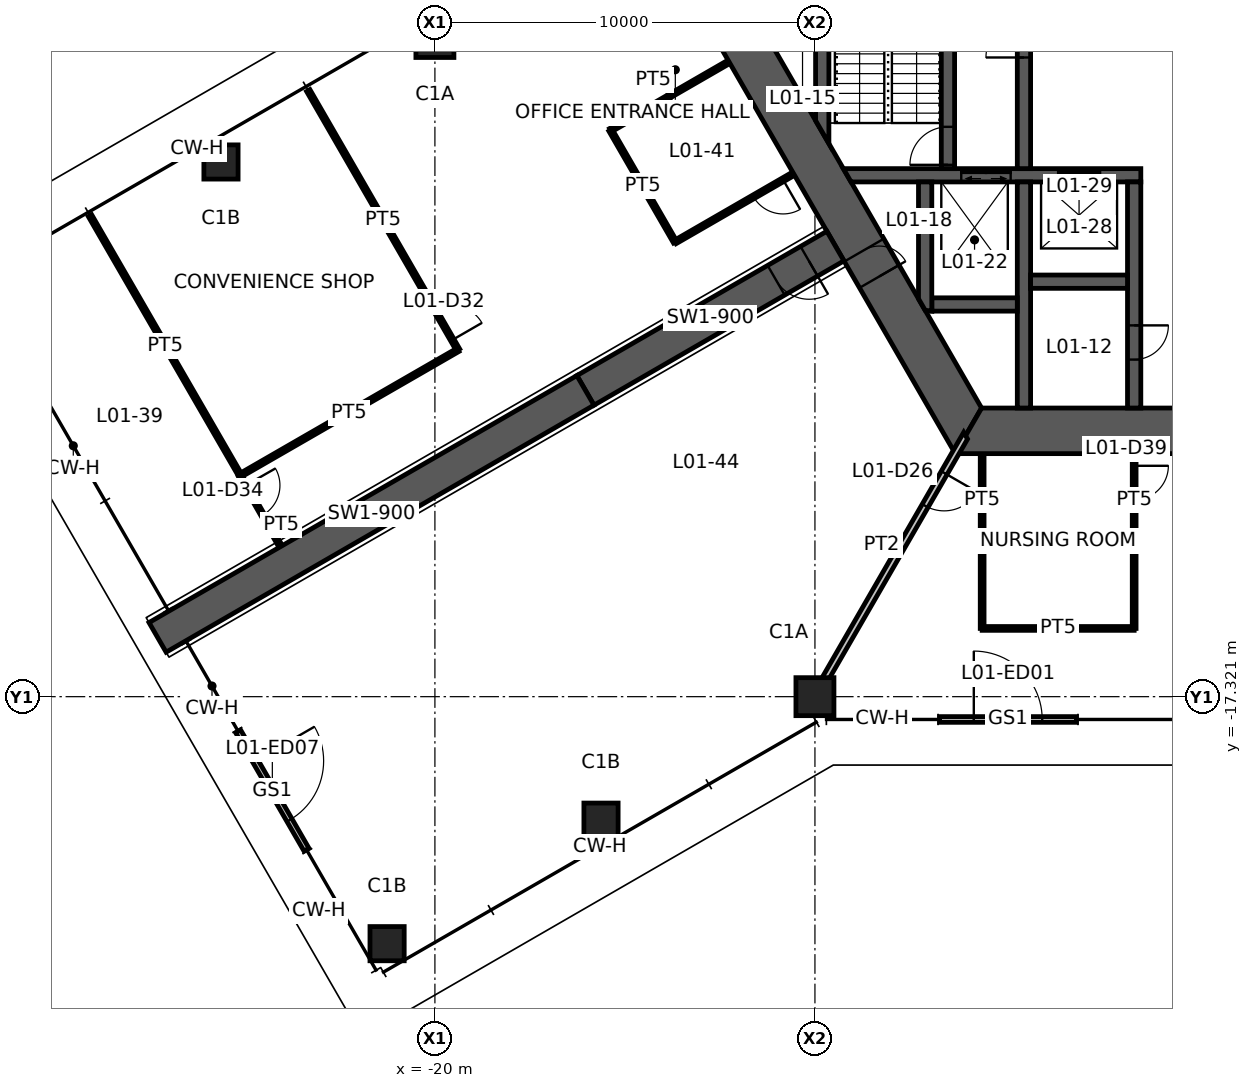
"""IFC4 building model, lengths in metres.
Left out: names, types, materials, properties, quantities, classifications, styles, units other than length and angle.
Written with IfcOpenShell. Run it as: python <this file> out.ifc"""

import sys

from ifc_helpers import new_model, si_unit, direction, frame, frame_2d, origin, origin_2d, place, context, subcontext, project, spatial, polyline, rectangle, hollow_rectangle, outline, extrude, element, fill, save


model = new_model("IFC4")
c1 = context("Model", 3, precision=1e-05, world=origin(), true_north=direction((0.0, 1.0)))
c2 = subcontext(c1, "Body", "Model", "MODEL_VIEW")
j1 = project(units=[si_unit("LENGTHUNIT", "METRE"), si_unit("PLANEANGLEUNIT", "RADIAN")], contexts=[c1])
p1 = place(None, origin())
s1 = spatial("IfcSite", under=j1, at=p1, CompositionType="ELEMENT")
p2 = place(p1, origin())
s2 = spatial("IfcBuilding", under=s1, at=p2, CompositionType="ELEMENT")
p3 = place(p2, origin())
s3 = spatial("IfcBuildingStorey", under=s2, at=p3, CompositionType="ELEMENT", Elevation=0.0)
for number, where, z_axis, x_axis in (
    (1, (-20.0, 0.0, 0.0), (0.0, 0.0, 1.0), (1.0, 0.0, 0.0)),
    (2, (-10.0, -17.321, 0.0), (0.0, 0.0, 1.0), (1.0, 0.0, 0.0)),
):
    element("IfcColumn", number, at=place(p3, frame(where, z_axis=z_axis, x_axis=x_axis)), inside=s3, PredefinedType="COLUMN", context=c2, shape_type="SweptSolid", body=[
        extrude(hollow_rectangle(XDim=1.0, YDim=1.0, WallThickness=0.06, at=origin_2d()), origin(), (0.0, 0.0, 1.0), 5.5),
    ])
for number, where, z_axis, x_axis in (
    (3, (-25.629, -3.25, 0.0), (0.0, 0.0, 1.0), (1.0, 0.0, 0.0)),
    (4, (-15.629, -20.571, 0.0), (0.0, 0.0, 1.0), (1.0, 0.0, 0.0)),
    (5, (-21.258, -23.821, 0.0), (0.0, 0.0, 1.0), (1.0, 0.0, 0.0)),
):
    element("IfcColumn", number, at=place(p3, frame(where, z_axis=z_axis, x_axis=x_axis)), inside=s3, PredefinedType="COLUMN", context=c2, shape_type="SweptSolid", body=[
        extrude(hollow_rectangle(XDim=0.9, YDim=0.9, WallThickness=0.05, at=origin_2d()), origin(), (0.0, 0.0, 1.0), 5.5),
    ])
p4 = place(p3, frame((-11.922, 0.0, 0.0), z_axis=(0.0, 0.0, 1.0), x_axis=(0.500004296715, -0.866022923061, 0.0)))
e6 = element("IfcWall", 6, at=p4, inside=s3, PredefinedType="SHEAR", context=c2, shape_type="SweptSolid", body=[
    extrude(outline(polyline([(-0.346, -0.6), (6.431, -0.6), (7.231, -0.6), (12.269, -0.6), (11.576, 0.6), (7.231, 0.6), (6.431, 0.6), (0.346, 0.6), (-0.346, -0.6)])), origin(), (0.0, 0.0, 1.0), 5.5),
])
p5 = place(p4, frame((6.431, 0.0, 0.0)))
e7 = element("IfcOpeningElement", 7, at=p5, cuts=e6, PredefinedType="OPENING", context=c2, shape_type="SweptSolid", body=[
    extrude(rectangle(XDim=0.8, YDim=2.1, at=frame_2d((0.4, 1.05))), frame((0.0, 0.61, 0.0), z_axis=(0.0, -1.0, 0.0), x_axis=(1.0, 0.0, 0.0)), (0.0, 0.0, 1.0), 1.22),
])
p6 = place(p3, frame((-5.961, -10.325, 0.0), z_axis=(0.0, 0.0, 1.0), x_axis=(1.0, 0.0, 0.0)))
e8 = element("IfcWall", 8, at=p6, inside=s3, PredefinedType="SHEAR", context=c2, shape_type="SweptSolid", body=[
    extrude(outline(polyline([(-0.346, -0.6), (5.461, -0.6), (6.461, -0.6), (12.269, -0.6), (11.576, 0.6), (6.461, 0.6), (5.461, 0.6), (0.346, 0.6), (-0.346, -0.6)])), origin(), (0.0, 0.0, 1.0), 5.5),
])
p7 = place(p6, frame((5.461, 0.0, 0.0)))
e9 = element("IfcOpeningElement", 9, at=p7, cuts=e8, PredefinedType="OPENING", context=c2, shape_type="SweptSolid", body=[
    extrude(rectangle(XDim=1.0, YDim=2.1, at=frame_2d((0.5, 1.05))), frame((0.0, 0.61, 0.0), z_axis=(0.0, -1.0, 0.0), x_axis=(1.0, 0.0, 0.0)), (0.0, 0.0, 1.0), 1.22),
])
p8 = place(p3, frame((-9.461, -5.462, 0.0), z_axis=(0.0, 0.0, 1.0), x_axis=(-0.866019116917, -0.500010889016, 0.0)))
e10 = element("IfcWall", 10, at=p8, inside=s3, PredefinedType="SHEAR", context=c2, shape_type="SweptSolid", body=[
    extrude(rectangle(XDim=7.595, YDim=0.9, at=frame_2d((3.798, 0.0))), origin(), (0.0, 0.0, 1.0), 5.5),
])
p9 = place(p8, frame((0.8, 0.0, 0.0)))
e11 = element("IfcOpeningElement", 11, at=p9, cuts=e10, PredefinedType="OPENING", context=c2, shape_type="SweptSolid", body=[
    extrude(rectangle(XDim=1.0, YDim=2.1, at=frame_2d((0.5, 1.05))), frame((0.0, 0.46, 0.0), z_axis=(0.0, -1.0, 0.0), x_axis=(1.0, 0.0, 0.0)), (0.0, 0.0, 1.0), 0.92),
])
p10 = place(p3, frame((-16.039, -9.26, 0.0), z_axis=(0.0, 0.0, 1.0), x_axis=(-0.866024837091, -0.50000098154, 0.0)))
e12 = element("IfcWall", 12, at=p10, inside=s3, PredefinedType="SHEAR", context=c2, shape_type="SweptSolid", body=[
    extrude(rectangle(XDim=13.0, YDim=0.9, at=frame_2d((6.5, 0.0))), origin(), (0.0, 0.0, 1.0), 5.5),
])
p11 = place(p3, frame((-6.72, -17.92, 0.0), z_axis=(0.0, 0.0, 1.0), x_axis=(1.0, 0.0, 0.0)))
e13 = element("IfcWall", 13, at=p11, inside=s3, PredefinedType="STANDARD", context=c2, shape_type="SweptSolid", body=[
    extrude(rectangle(XDim=3.6, YDim=0.15, at=frame_2d((1.8, 0.0))), origin(), (0.0, 0.0, 1.0), 5.5),
])
p12 = place(p11, frame((0.9, 0.0, 0.0)))
e14 = element("IfcOpeningElement", 14, at=p12, cuts=e13, PredefinedType="OPENING", context=c2, shape_type="SweptSolid", body=[
    extrude(rectangle(XDim=1.8, YDim=2.4, at=frame_2d((0.9, 1.2))), frame((0.0, 0.085, 0.0), z_axis=(0.0, -1.0, 0.0), x_axis=(1.0, 0.0, 0.0)), (0.0, 0.0, 1.0), 0.17),
])
p13 = place(p3, frame((-25.178, -18.231, 0.0), z_axis=(0.0, 0.0, 1.0), x_axis=(0.500012057535, -0.866018442252, 0.0)))
e15 = element("IfcWall", 15, at=p13, inside=s3, PredefinedType="STANDARD", context=c2, shape_type="SweptSolid", body=[
    extrude(rectangle(XDim=3.6, YDim=0.15, at=frame_2d((1.8, 0.0))), origin(), (0.0, 0.0, 1.0), 5.5),
])
p14 = place(p13, frame((0.9, 0.0, 0.0)))
e16 = element("IfcOpeningElement", 16, at=p14, cuts=e15, PredefinedType="OPENING", context=c2, shape_type="SweptSolid", body=[
    extrude(rectangle(XDim=1.8, YDim=2.4, at=frame_2d((0.9, 1.2))), frame((0.0, 0.085, 0.0), z_axis=(0.0, -1.0, 0.0), x_axis=(1.0, 0.0, 0.0)), (0.0, 0.0, 1.0), 0.17),
])
p15 = place(p3, frame((-9.151, -3.6, 0.0), z_axis=(0.0, 0.0, 1.0), x_axis=(1.0, 0.0, 0.0)))
e17 = element("IfcWall", 17, at=p15, inside=s3, PredefinedType="SHEAR", context=c2, shape_type="SweptSolid", body=[
    extrude(outline(polyline([(0.101, -0.175), (3.001, -0.175), (4.301, -0.175), (5.551, -0.175), (6.651, -0.175), (7.726, -0.175), (7.726, 0.175), (6.651, 0.175), (5.551, 0.175), (4.301, 0.175), (3.001, 0.175), (-0.101, 0.175), (0.101, -0.175)])), origin(), (0.0, 0.0, 1.0), 5.5),
])
p16 = place(p15, frame((5.551, 0.0, 0.0)))
e18 = element("IfcOpeningElement", 18, at=p16, cuts=e17, PredefinedType="OPENING", context=c2, shape_type="SweptSolid", body=[
    extrude(rectangle(XDim=1.1, YDim=2.1, at=frame_2d((0.55, 1.05))), frame((0.0, 0.185, 0.0), z_axis=(0.0, -1.0, 0.0), x_axis=(1.0, 0.0, 0.0)), (0.0, 0.0, 1.0), 0.37),
])
p17 = place(p15, frame((3.001, 0.0, 0.0)))
e19 = element("IfcOpeningElement", 19, at=p17, cuts=e17, PredefinedType="OPENING", context=c2, shape_type="SweptSolid", body=[
    extrude(rectangle(XDim=1.3, YDim=2.1, at=frame_2d((0.65, 1.05))), frame((0.0, 0.185, 0.0), z_axis=(0.0, -1.0, 0.0), x_axis=(1.0, 0.0, 0.0)), (0.0, 0.0, 1.0), 0.37),
])
p18 = place(p3, frame((-1.6, -3.775, 0.0), z_axis=(0.0, 0.0, 1.0), x_axis=(0.0, -1.0, 0.0)))
e20 = element("IfcWall", 20, at=p18, inside=s3, PredefinedType="SHEAR", context=c2, shape_type="SweptSolid", body=[
    extrude(rectangle(XDim=5.95, YDim=0.35, at=frame_2d((2.975, 0.0))), origin(), (0.0, 0.0, 1.0), 5.5),
])
p19 = place(p18, frame((3.775, 0.0, 0.0)))
e21 = element("IfcOpeningElement", 21, at=p19, cuts=e20, PredefinedType="OPENING", context=c2, shape_type="SweptSolid", body=[
    extrude(rectangle(XDim=0.9, YDim=2.1, at=frame_2d((0.45, 1.05))), frame((0.0, 0.185, 0.0), z_axis=(0.0, -1.0, 0.0), x_axis=(1.0, 0.0, 0.0)), (0.0, 0.0, 1.0), 0.37),
])
p20 = place(p3, frame((-4.5, -3.425, 0.0), z_axis=(0.0, 0.0, 1.0), x_axis=(0.0, 1.0, 0.0)))
e22 = element("IfcWall", 22, at=p20, inside=s3, PredefinedType="SHEAR", context=c2, shape_type="SweptSolid", body=[
    extrude(rectangle(XDim=6.85, YDim=0.35, at=frame_2d((3.425, 0.0))), origin(), (0.0, 0.0, 1.0), 5.5),
])
p21 = place(p20, frame((2.925, 0.0, 0.0)))
e23 = element("IfcOpeningElement", 23, at=p21, cuts=e22, PredefinedType="OPENING", context=c2, shape_type="SweptSolid", body=[
    extrude(rectangle(XDim=1.0, YDim=2.1, at=frame_2d((0.5, 1.05))), frame((0.0, 0.185, 0.0), z_axis=(0.0, -1.0, 0.0), x_axis=(1.0, 0.0, 0.0)), (0.0, 0.0, 1.0), 0.37),
])
p22 = place(p3, frame((-6.5, -3.425, 0.0), z_axis=(0.0, 0.0, 1.0), x_axis=(0.0, 1.0, 0.0)))
e24 = element("IfcWall", 24, at=p22, inside=s3, PredefinedType="SHEAR", context=c2, shape_type="SweptSolid", body=[
    extrude(rectangle(XDim=6.85, YDim=0.35, at=frame_2d((3.425, 0.0))), origin(), (0.0, 0.0, 1.0), 5.5),
])
p23 = place(p22, frame((0.1, 0.0, 0.0)))
e25 = element("IfcOpeningElement", 25, at=p23, cuts=e24, PredefinedType="OPENING", context=c2, shape_type="SweptSolid", body=[
    extrude(rectangle(XDim=1.0, YDim=2.1, at=frame_2d((0.5, 1.05))), frame((0.0, 0.185, 0.0), z_axis=(0.0, -1.0, 0.0), x_axis=(1.0, 0.0, 0.0)), (0.0, 0.0, 1.0), 0.37),
])
p24 = place(p3, frame((-4.5, -3.775, 0.0), z_axis=(0.0, 0.0, 1.0), x_axis=(0.0, -1.0, 0.0)))
e26 = element("IfcWall", 26, at=p24, inside=s3, PredefinedType="SHEAR", context=c2, shape_type="SweptSolid", body=[
    extrude(rectangle(XDim=5.95, YDim=0.35, at=frame_2d((2.975, 0.0))), origin(), (0.0, 0.0, 1.0), 5.5),
])
p25 = place(p3, frame((-4.325, -6.4, 0.0), z_axis=(0.0, 0.0, 1.0), x_axis=(1.0, 0.0, 0.0)))
e27 = element("IfcWall", 27, at=p25, inside=s3, PredefinedType="SHEAR", context=c2, shape_type="SweptSolid", body=[
    extrude(rectangle(XDim=2.55, YDim=0.35, at=frame_2d((1.275, 0.0))), origin(), (0.0, 0.0, 1.0), 5.5),
])
p26 = place(p3, frame((-6.925, -7.0, 0.0), z_axis=(0.0, 0.0, 1.0), x_axis=(1.0, 0.0, 0.0)))
e28 = element("IfcWall", 28, at=p26, inside=s3, PredefinedType="SHEAR", context=c2, shape_type="SweptSolid", body=[
    extrude(rectangle(XDim=2.25, YDim=0.35, at=frame_2d((1.125, 0.0))), origin(), (0.0, 0.0, 1.0), 5.5),
])
p27 = place(p3, frame((-7.1, -3.775, 0.0), z_axis=(0.0, 0.0, 1.0), x_axis=(0.0, -1.0, 0.0)))
e29 = element("IfcWall", 29, at=p27, inside=s3, PredefinedType="SHEAR", context=c2, shape_type="SweptSolid", body=[
    extrude(outline(polyline([(0.0, -0.175), (3.074, -0.175), (3.377, 0.0), (3.4, 0.175), (0.0, 0.175), (0.0, -0.175)])), origin(), (0.0, 0.0, 1.0), 5.5),
])
p28 = place(p3, frame((-9.808, -2.462, 0.0), z_axis=(0.0, 0.0, 1.0), x_axis=(0.0, 1.0, 0.0)))
e30 = element("IfcWall", 30, at=p28, inside=s3, PredefinedType="SHEAR", context=c2, shape_type="SweptSolid", body=[
    extrude(outline(polyline([(-0.303, -0.175), (5.228, -0.175), (4.621, 0.175), (0.303, 0.175), (-0.303, -0.175)])), origin(), (0.0, 0.0, 1.0), 5.5),
])
p29 = place(p3, frame((-6.035, -10.453, 0.0), z_axis=(0.0, 0.0, 1.0), x_axis=(-0.499993402427, -0.866029212861, 0.0)))
e31 = element("IfcWall", 31, at=p29, inside=s3, PredefinedType="PARTITIONING", context=c2, shape_type="SweptSolid", body=[
    extrude(outline(polyline([(-0.051, -0.087), (1.129, -0.087), (2.129, -0.087), (7.93, -0.087), (7.93, 0.087), (2.129, 0.087), (1.129, 0.087), (0.051, 0.087), (-0.051, -0.087)])), origin(), (0.0, 0.0, 1.0), 4.6),
])
p30 = place(p29, frame((1.129, 0.0, 0.0)))
e32 = element("IfcOpeningElement", 32, at=p30, cuts=e31, PredefinedType="OPENING", context=c2, shape_type="SweptSolid", body=[
    extrude(rectangle(XDim=1.0, YDim=2.1, at=frame_2d((0.5, 1.05))), frame((0.0, 0.098, 0.0), z_axis=(0.0, -1.0, 0.0), x_axis=(1.0, 0.0, 0.0)), (0.0, 0.0, 1.0), 0.195),
])
p31 = place(p3, frame((-25.12, -11.501, 0.0), z_axis=(0.0, 0.0, 1.0), x_axis=(-0.50060862307, 0.865673729825, 0.0)))
e33 = element("IfcWall", 33, at=p31, inside=s3, PredefinedType="PARTITIONING", context=c2, shape_type="SweptSolid", body=[
    extrude(rectangle(XDim=7.9, YDim=0.1, at=frame_2d((3.95, 0.0))), origin(), (0.0, 0.0, 1.0), 4.5),
])
p32 = place(p3, frame((-23.332, -1.37, 0.0), z_axis=(0.0, 0.0, 1.0), x_axis=(0.500021035396, -0.866013258652, 0.0)))
e34 = element("IfcWall", 34, at=p32, inside=s3, PredefinedType="PARTITIONING", context=c2, shape_type="SweptSolid", body=[
    extrude(rectangle(XDim=7.88, YDim=0.1, at=frame_2d((3.94, 0.0))), origin(), (0.0, 0.0, 1.0), 4.5),
])
p33 = place(p32, frame((6.68, 0.0, 0.0)))
e35 = element("IfcOpeningElement", 35, at=p33, cuts=e34, PredefinedType="OPENING", context=c2, shape_type="SweptSolid", body=[
    extrude(rectangle(XDim=0.9, YDim=2.1, at=frame_2d((0.45, 1.05))), frame((0.0, 0.06, 0.0), z_axis=(0.0, -1.0, 0.0), x_axis=(1.0, 0.0, 0.0)), (0.0, 0.0, 1.0), 0.12),
])
p34 = place(p3, frame((-19.392, -8.194, 0.0), z_axis=(0.0, 0.0, 1.0), x_axis=(-0.866327998015, -0.499475524781, 0.0)))
e36 = element("IfcWall", 36, at=p34, inside=s3, PredefinedType="PARTITIONING", context=c2, shape_type="SweptSolid", body=[
    extrude(rectangle(XDim=6.62, YDim=0.1, at=frame_2d((3.31, 0.0))), origin(), (0.0, 0.0, 1.0), 4.5),
])
p35 = place(p3, frame((-25.126, -11.5, 0.0), z_axis=(0.0, 0.0, 1.0), x_axis=(0.496175899628, -0.868222020354, 0.0)))
e37 = element("IfcWall", 37, at=p35, inside=s3, PredefinedType="PARTITIONING", context=c2, shape_type="SweptSolid", body=[
    extrude(rectangle(XDim=2.134, YDim=0.1, at=frame_2d((1.067, 0.0))), origin(), (0.0, 0.0, 1.0), 4.5),
])
p36 = place(p35, frame((0.3, 0.0, 0.0)))
e38 = element("IfcOpeningElement", 38, at=p36, cuts=e37, PredefinedType="OPENING", context=c2, shape_type="SweptSolid", body=[
    extrude(rectangle(XDim=0.9, YDim=2.1, at=frame_2d((0.45, 1.05))), frame((0.0, 0.06, 0.0), z_axis=(0.0, -1.0, 0.0), x_axis=(1.0, 0.0, 0.0)), (0.0, 0.0, 1.0), 0.12),
])
p37 = place(p3, frame((-15.379, -2.413, 0.0), z_axis=(0.0, 0.0, 1.0), x_axis=(0.866018643436, 0.500011709085, 0.0)))
e39 = element("IfcWall", 39, at=p37, inside=s3, PredefinedType="PARTITIONING", context=c2, shape_type="SweptSolid", body=[
    extrude(rectangle(XDim=3.58, YDim=0.1, at=frame_2d((1.79, 0.0))), origin(), (0.0, 0.0, 1.0), 4.5),
])
p38 = place(p3, frame((-13.679, -5.357, 0.0), z_axis=(0.0, 0.0, 1.0), x_axis=(-0.500008388397, 0.866020560687, 0.0)))
e40 = element("IfcWall", 40, at=p38, inside=s3, PredefinedType="PARTITIONING", context=c2, shape_type="SweptSolid", body=[
    extrude(rectangle(XDim=3.4, YDim=0.1, at=frame_2d((1.7, 0.0))), origin(), (0.0, 0.0, 1.0), 4.5),
])
p39 = place(p3, frame((-10.579, -3.567, 0.0), z_axis=(0.0, 0.0, 1.0), x_axis=(-0.866018643436, -0.500011709085, 0.0)))
e41 = element("IfcWall", 41, at=p39, inside=s3, PredefinedType="PARTITIONING", context=c2, shape_type="SweptSolid", body=[
    extrude(rectangle(XDim=3.58, YDim=0.1, at=frame_2d((1.79, 0.0))), origin(), (0.0, 0.0, 1.0), 4.5),
])
p40 = place(p39, frame((0.3, 0.0, 0.0)))
e42 = element("IfcOpeningElement", 42, at=p40, cuts=e41, PredefinedType="OPENING", context=c2, shape_type="SweptSolid", body=[
    extrude(rectangle(XDim=0.9, YDim=2.1, at=frame_2d((0.45, 1.05))), frame((0.0, 0.06, 0.0), z_axis=(0.0, -1.0, 0.0), x_axis=(1.0, 0.0, 0.0)), (0.0, 0.0, 1.0), 0.12),
])
p41 = place(p3, frame((-5.6, -15.525, 0.0), z_axis=(0.0, 0.0, 1.0), x_axis=(0.0, 1.0, 0.0)))
e43 = element("IfcWall", 43, at=p41, inside=s3, PredefinedType="PARTITIONING", context=c2, shape_type="SweptSolid", body=[
    extrude(rectangle(XDim=4.58, YDim=0.1, at=frame_2d((2.29, 0.0))), origin(), (0.0, 0.0, 1.0), 4.5),
])
p42 = place(p3, frame((-1.6, -15.525, 0.0), z_axis=(0.0, 0.0, 1.0), x_axis=(-1.0, 0.0, 0.0)))
e44 = element("IfcWall", 44, at=p42, inside=s3, PredefinedType="PARTITIONING", context=c2, shape_type="SweptSolid", body=[
    extrude(rectangle(XDim=4.0, YDim=0.1, at=frame_2d((2.0, 0.0))), origin(), (0.0, 0.0, 1.0), 4.5),
])
p43 = place(p3, frame((-1.6, -10.945, 0.0), z_axis=(0.0, 0.0, 1.0), x_axis=(0.0, -1.0, 0.0)))
e45 = element("IfcWall", 45, at=p43, inside=s3, PredefinedType="PARTITIONING", context=c2, shape_type="SweptSolid", body=[
    extrude(rectangle(XDim=4.58, YDim=0.1, at=frame_2d((2.29, 0.0))), origin(), (0.0, 0.0, 1.0), 4.5),
])
p44 = place(p43, frame((0.3, 0.0, 0.0)))
e46 = element("IfcOpeningElement", 46, at=p44, cuts=e45, PredefinedType="OPENING", context=c2, shape_type="SweptSolid", body=[
    extrude(rectangle(XDim=0.9, YDim=2.1, at=frame_2d((0.45, 1.05))), frame((0.0, 0.06, 0.0), z_axis=(0.0, -1.0, 0.0), x_axis=(1.0, 0.0, 0.0)), (0.0, 0.0, 1.0), 0.12),
])
p45 = place(p12, origin())
e47 = element("IfcDoor", 47, at=p45, inside=s3, OperationType="DOUBLE_DOOR_SINGLE_SWING", PredefinedType="DOOR", context=c2, shape_type="SweptSolid", body=[
    extrude(rectangle(XDim=1.8, YDim=2.4, at=frame_2d((0.9, 1.2))), frame((0.0, 0.025, 0.0), z_axis=(0.0, -1.0, 0.0), x_axis=(1.0, 0.0, 0.0)), (0.0, 0.0, 1.0), 0.05),
])
fill(e14, e47)
p46 = place(p14, origin())
e48 = element("IfcDoor", 48, at=p46, inside=s3, OperationType="DOUBLE_DOOR_SINGLE_SWING", PredefinedType="DOOR", context=c2, shape_type="SweptSolid", body=[
    extrude(rectangle(XDim=1.8, YDim=2.4, at=frame_2d((0.9, 1.2))), frame((0.0, 0.025, 0.0), z_axis=(0.0, -1.0, 0.0), x_axis=(1.0, 0.0, 0.0)), (0.0, 0.0, 1.0), 0.05),
])
fill(e16, e48)
p47 = place(p5, origin())
e49 = element("IfcDoor", 49, at=p47, inside=s3, OperationType="SINGLE_SWING_RIGHT", PredefinedType="DOOR", context=c2, shape_type="SweptSolid", body=[
    extrude(rectangle(XDim=0.8, YDim=2.1, at=frame_2d((0.4, 1.05))), frame((0.0, 0.025, 0.0), z_axis=(0.0, -1.0, 0.0), x_axis=(1.0, 0.0, 0.0)), (0.0, 0.0, 1.0), 0.05),
])
fill(e7, e49)
p48 = place(p21, origin())
e50 = element("IfcDoor", 50, at=p48, inside=s3, OperationType="SINGLE_SWING_LEFT", PredefinedType="DOOR", context=c2, shape_type="SweptSolid", body=[
    extrude(rectangle(XDim=1.0, YDim=2.1, at=frame_2d((0.5, 1.05))), frame((0.0, 0.025, 0.0), z_axis=(0.0, -1.0, 0.0), x_axis=(1.0, 0.0, 0.0)), (0.0, 0.0, 1.0), 0.05),
])
fill(e23, e50)
p49 = place(p23, origin())
e51 = element("IfcDoor", 51, at=p49, inside=s3, OperationType="SINGLE_SWING_LEFT", PredefinedType="DOOR", context=c2, shape_type="SweptSolid", body=[
    extrude(rectangle(XDim=1.0, YDim=2.1, at=frame_2d((0.5, 1.05))), frame((0.0, 0.025, 0.0), z_axis=(0.0, -1.0, 0.0), x_axis=(1.0, 0.0, 0.0)), (0.0, 0.0, 1.0), 0.05),
])
fill(e25, e51)
p50 = place(p19, origin())
e52 = element("IfcDoor", 52, at=p50, inside=s3, OperationType="SINGLE_SWING_LEFT", PredefinedType="DOOR", context=c2, shape_type="SweptSolid", body=[
    extrude(rectangle(XDim=0.9, YDim=2.1, at=frame_2d((0.45, 1.05))), frame((0.0, 0.025, 0.0), z_axis=(0.0, -1.0, 0.0), x_axis=(1.0, 0.0, 0.0)), (0.0, 0.0, 1.0), 0.05),
])
fill(e21, e52)
p51 = place(p9, origin())
e53 = element("IfcDoor", 53, at=p51, inside=s3, OperationType="SINGLE_SWING_LEFT", PredefinedType="DOOR", context=c2, shape_type="SweptSolid", body=[
    extrude(rectangle(XDim=1.0, YDim=2.1, at=frame_2d((0.5, 1.05))), frame((0.0, 0.025, 0.0), z_axis=(0.0, -1.0, 0.0), x_axis=(1.0, 0.0, 0.0)), (0.0, 0.0, 1.0), 0.05),
])
fill(e11, e53)
p52 = place(p30, origin())
e54 = element("IfcDoor", 54, at=p52, inside=s3, OperationType="SINGLE_SWING_LEFT", PredefinedType="DOOR", context=c2, shape_type="SweptSolid", body=[
    extrude(rectangle(XDim=1.0, YDim=2.1, at=frame_2d((0.5, 1.05))), frame((0.0, 0.025, 0.0), z_axis=(0.0, -1.0, 0.0), x_axis=(1.0, 0.0, 0.0)), (0.0, 0.0, 1.0), 0.05),
])
fill(e32, e54)
p53 = place(p33, origin())
e55 = element("IfcDoor", 55, at=p53, inside=s3, OperationType="SINGLE_SWING_RIGHT", PredefinedType="DOOR", context=c2, shape_type="SweptSolid", body=[
    extrude(rectangle(XDim=0.9, YDim=2.1, at=frame_2d((0.45, 1.05))), frame((0.0, 0.025, 0.0), z_axis=(0.0, -1.0, 0.0), x_axis=(1.0, 0.0, 0.0)), (0.0, 0.0, 1.0), 0.05),
])
fill(e35, e55)
p54 = place(p36, origin())
e56 = element("IfcDoor", 56, at=p54, inside=s3, OperationType="SINGLE_SWING_LEFT", PredefinedType="DOOR", context=c2, shape_type="SweptSolid", body=[
    extrude(rectangle(XDim=0.9, YDim=2.1, at=frame_2d((0.45, 1.05))), frame((0.0, 0.025, 0.0), z_axis=(0.0, -1.0, 0.0), x_axis=(1.0, 0.0, 0.0)), (0.0, 0.0, 1.0), 0.05),
])
fill(e38, e56)
p55 = place(p40, origin())
e57 = element("IfcDoor", 57, at=p55, inside=s3, OperationType="SINGLE_SWING_LEFT", PredefinedType="DOOR", context=c2, shape_type="SweptSolid", body=[
    extrude(rectangle(XDim=0.9, YDim=2.1, at=frame_2d((0.45, 1.05))), frame((0.0, 0.025, 0.0), z_axis=(0.0, -1.0, 0.0), x_axis=(1.0, 0.0, 0.0)), (0.0, 0.0, 1.0), 0.05),
])
fill(e42, e57)
p56 = place(p44, origin())
e58 = element("IfcDoor", 58, at=p56, inside=s3, OperationType="SINGLE_SWING_LEFT", PredefinedType="DOOR", context=c2, shape_type="SweptSolid", body=[
    extrude(rectangle(XDim=0.9, YDim=2.1, at=frame_2d((0.45, 1.05))), frame((0.0, 0.025, 0.0), z_axis=(0.0, -1.0, 0.0), x_axis=(1.0, 0.0, 0.0)), (0.0, 0.0, 1.0), 0.05),
])
fill(e46, e58)
p57 = place(p16, origin())
e59 = element("IfcDoor", 59, at=p57, inside=s3, OperationType="DOUBLE_DOOR_SLIDING", PredefinedType="DOOR", context=c2, shape_type="SweptSolid", body=[
    extrude(rectangle(XDim=1.1, YDim=2.1, at=frame_2d((0.55, 1.05))), frame((0.0, 0.025, 0.0), z_axis=(0.0, -1.0, 0.0), x_axis=(1.0, 0.0, 0.0)), (0.0, 0.0, 1.0), 0.05),
])
fill(e18, e59)
p58 = place(p17, origin())
e60 = element("IfcDoor", 60, at=p58, inside=s3, OperationType="DOUBLE_DOOR_SLIDING", PredefinedType="DOOR", context=c2, shape_type="SweptSolid", body=[
    extrude(rectangle(XDim=1.3, YDim=2.1, at=frame_2d((0.65, 1.05))), frame((0.0, 0.025, 0.0), z_axis=(0.0, -1.0, 0.0), x_axis=(1.0, 0.0, 0.0)), (0.0, 0.0, 1.0), 0.05),
])
fill(e19, e60)
save(model, sys.argv[1])
